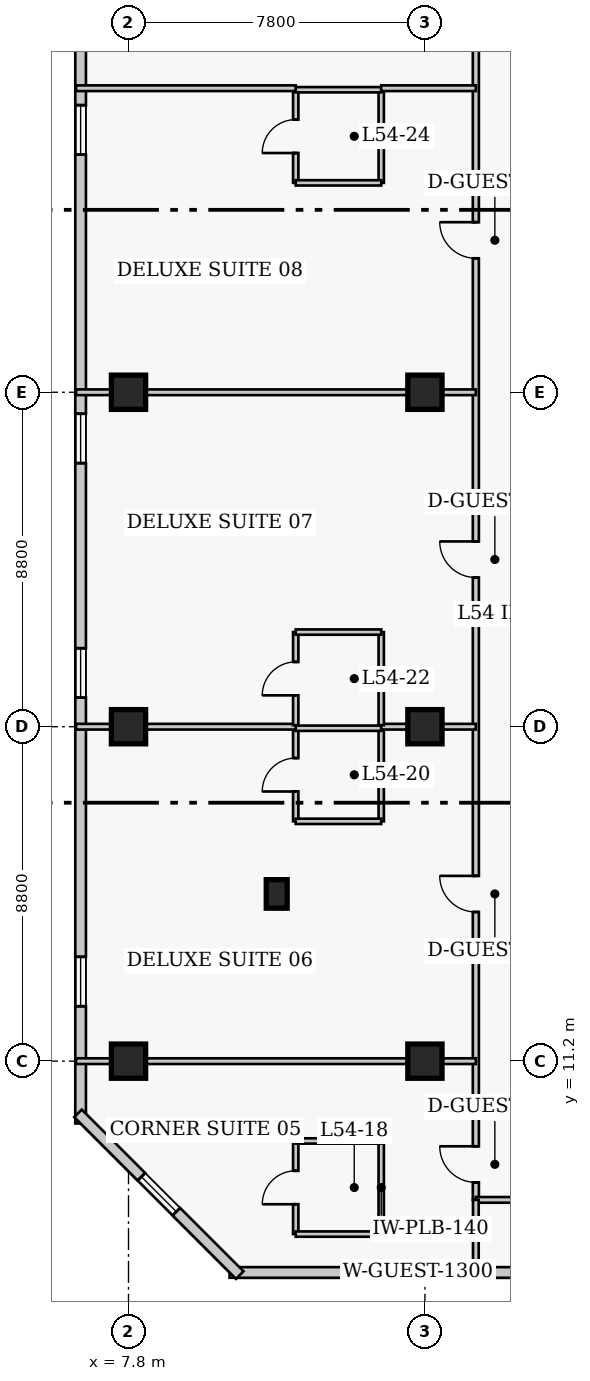
"""IFC4 building model, lengths in metres.
Left out: names, types, materials, properties, quantities, classifications, styles, units other than length and angle.
Written with IfcOpenShell. Run it as: python <this file> out.ifc"""

import sys

from ifc_helpers import new_model, si_unit, direction, frame, frame_2d, origin, origin_2d, place, context, subcontext, project, spatial, rectangle, extrude, element, fill, save


model = new_model("IFC4")
c1 = context("Model", 3, precision=1e-05, world=origin(), true_north=direction((0.0, 1.0)))
c2 = subcontext(c1, "Body", "Model", "MODEL_VIEW")
j1 = project(units=[si_unit("LENGTHUNIT", "METRE"), si_unit("PLANEANGLEUNIT", "RADIAN")], contexts=[c1])
p1 = place(None, origin())
s1 = spatial("IfcSite", under=j1, at=p1, CompositionType="ELEMENT")
p2 = place(p1, origin())
s2 = spatial("IfcBuilding", under=s1, at=p2, CompositionType="ELEMENT")
p3 = place(p2, frame((0.0, 0.0, 216.3)))
s3 = spatial("IfcBuildingStorey", under=s2, at=p3, CompositionType="ELEMENT", Elevation=216.3)
for number, where, z_axis, x_axis in (
    (1, (7.8, 11.2, 0.0), (0.0, 0.0, 1.0), (1.0, 0.0, 0.0)),
    (2, (7.8, 20.0, 0.0), (0.0, 0.0, 1.0), (1.0, 0.0, 0.0)),
    (3, (7.8, 28.8, 0.0), (0.0, 0.0, 1.0), (1.0, 0.0, 0.0)),
    (4, (15.6, 11.2, 0.0), (0.0, 0.0, 1.0), (1.0, 0.0, 0.0)),
    (5, (15.6, 20.0, 0.0), (0.0, 0.0, 1.0), (1.0, 0.0, 0.0)),
    (6, (15.6, 28.8, 0.0), (0.0, 0.0, 1.0), (1.0, 0.0, 0.0)),
):
    element("IfcColumn", number, at=place(p3, frame(where, z_axis=z_axis, x_axis=x_axis)), inside=s3, PredefinedType="COLUMN", context=c2, shape_type="SweptSolid", body=[
        extrude(rectangle(XDim=0.9, YDim=0.9, at=origin_2d()), origin(), (0.0, 0.0, 1.0), 3.9),
    ])
p4 = place(p3, frame((11.7, 15.6, 0.0), z_axis=(0.0, 0.0, 1.0), x_axis=(1.0, 0.0, 0.0)))
e7 = element("IfcColumn", 7, at=p4, inside=s3, PredefinedType="PILASTER", context=c2, shape_type="SweptSolid", body=[
    extrude(rectangle(XDim=0.55, YDim=0.75, at=origin_2d()), origin(), (0.0, 0.0, 1.0), 3.9),
])
p5 = place(p3, frame((10.46, 5.64, 0.0), z_axis=(0.0, 0.0, 1.0), x_axis=(1.0, 0.0, 0.0)))
e8 = element("IfcWall", 8, at=p5, inside=s3, PredefinedType="SOLIDWALL", context=c2, shape_type="SweptSolid", body=[
    extrude(rectangle(XDim=25.83, YDim=0.28, at=frame_2d((12.915, 0.0))), origin(), (0.0, 0.0, 1.0), 3.65),
])
p6 = place(p5, frame((4.305, 0.0, 0.85)))
e9 = element("IfcOpeningElement", 9, at=p6, cuts=e8, PredefinedType="OPENING", context=c2, shape_type="SweptSolid", body=[
    extrude(rectangle(XDim=1.3, YDim=1.7, at=frame_2d((0.65, 0.85))), frame((0.0, 0.15, 0.0), z_axis=(0.0, -1.0, 0.0), x_axis=(1.0, 0.0, 0.0)), (0.0, 0.0, 1.0), 0.3),
])
p7 = place(p5, frame((11.615, 0.0, 0.85)))
e10 = element("IfcOpeningElement", 10, at=p7, cuts=e8, PredefinedType="OPENING", context=c2, shape_type="SweptSolid", body=[
    extrude(rectangle(XDim=1.3, YDim=1.7, at=frame_2d((0.65, 0.85))), frame((0.0, 0.15, 0.0), z_axis=(0.0, -1.0, 0.0), x_axis=(1.0, 0.0, 0.0)), (0.0, 0.0, 1.0), 0.3),
])
p8 = place(p5, frame((20.875, 0.0, 0.85)))
e11 = element("IfcOpeningElement", 11, at=p8, cuts=e8, PredefinedType="OPENING", context=c2, shape_type="SweptSolid", body=[
    extrude(rectangle(XDim=1.3, YDim=1.7, at=frame_2d((0.65, 0.85))), frame((0.0, 0.15, 0.0), z_axis=(0.0, -1.0, 0.0), x_axis=(1.0, 0.0, 0.0)), (0.0, 0.0, 1.0), 0.3),
])
p9 = place(p5, frame((16.38, 0.0, 0.85)))
e12 = element("IfcOpeningElement", 12, at=p9, cuts=e8, PredefinedType="OPENING", context=c2, shape_type="SweptSolid", body=[
    extrude(rectangle(XDim=1.3, YDim=1.7, at=frame_2d((0.65, 0.85))), frame((0.0, 0.15, 0.0), z_axis=(0.0, -1.0, 0.0), x_axis=(1.0, 0.0, 0.0)), (0.0, 0.0, 1.0), 0.3),
])
p10 = place(p3, frame((6.54, 39.44, 0.0), z_axis=(0.0, 0.0, 1.0), x_axis=(0.0, -1.0, 0.0)))
e13 = element("IfcWall", 13, at=p10, inside=s3, PredefinedType="SOLIDWALL", context=c2, shape_type="SweptSolid", body=[
    extrude(rectangle(XDim=29.88, YDim=0.28, at=frame_2d((14.94, 0.0))), origin(), (0.0, 0.0, 1.0), 3.65),
])
p11 = place(p10, frame((3.085, 0.0, 0.85)))
e14 = element("IfcOpeningElement", 14, at=p11, cuts=e13, PredefinedType="OPENING", context=c2, shape_type="SweptSolid", body=[
    extrude(rectangle(XDim=1.3, YDim=1.7, at=frame_2d((0.65, 0.85))), frame((0.0, 0.15, 0.0), z_axis=(0.0, -1.0, 0.0), x_axis=(1.0, 0.0, 0.0)), (0.0, 0.0, 1.0), 0.3),
])
p12 = place(p10, frame((11.205, 0.0, 0.85)))
e15 = element("IfcOpeningElement", 15, at=p12, cuts=e13, PredefinedType="OPENING", context=c2, shape_type="SweptSolid", body=[
    extrude(rectangle(XDim=1.3, YDim=1.7, at=frame_2d((0.65, 0.85))), frame((0.0, 0.15, 0.0), z_axis=(0.0, -1.0, 0.0), x_axis=(1.0, 0.0, 0.0)), (0.0, 0.0, 1.0), 0.3),
])
p13 = place(p10, frame((17.375, 0.0, 0.85)))
e16 = element("IfcOpeningElement", 16, at=p13, cuts=e13, PredefinedType="OPENING", context=c2, shape_type="SweptSolid", body=[
    extrude(rectangle(XDim=1.3, YDim=1.7, at=frame_2d((0.65, 0.85))), frame((0.0, 0.15, 0.0), z_axis=(0.0, -1.0, 0.0), x_axis=(1.0, 0.0, 0.0)), (0.0, 0.0, 1.0), 0.3),
])
p14 = place(p10, frame((25.495, 0.0, 0.85)))
e17 = element("IfcOpeningElement", 17, at=p14, cuts=e13, PredefinedType="OPENING", context=c2, shape_type="SweptSolid", body=[
    extrude(rectangle(XDim=1.3, YDim=1.7, at=frame_2d((0.65, 0.85))), frame((0.0, 0.15, 0.0), z_axis=(0.0, -1.0, 0.0), x_axis=(1.0, 0.0, 0.0)), (0.0, 0.0, 1.0), 0.3),
])
p15 = place(p3, frame((6.471, 9.827, 0.0), z_axis=(0.0, 0.0, 1.0), x_axis=(0.707106781187, -0.707106781187, 0.0)))
e18 = element("IfcWall", 18, at=p15, inside=s3, PredefinedType="SOLIDWALL", context=c2, shape_type="SweptSolid", body=[
    extrude(rectangle(XDim=6.02, YDim=0.28, at=frame_2d((3.01, 0.0))), origin(), (0.0, 0.0, 1.0), 3.65),
])
p16 = place(p15, frame((2.36, 0.0, 0.85)))
e19 = element("IfcOpeningElement", 19, at=p16, cuts=e18, PredefinedType="OPENING", context=c2, shape_type="SweptSolid", body=[
    extrude(rectangle(XDim=1.3, YDim=1.7, at=frame_2d((0.65, 0.85))), frame((0.0, 0.15, 0.0), z_axis=(0.0, -1.0, 0.0), x_axis=(1.0, 0.0, 0.0)), (0.0, 0.0, 1.0), 0.3),
])
p17 = place(p3, frame((16.94, 7.55, 0.0), z_axis=(0.0, 0.0, 1.0), x_axis=(0.0, 1.0, 0.0)))
e20 = element("IfcWall", 20, at=p17, inside=s3, PredefinedType="PARTITIONING", context=c2, shape_type="SweptSolid", body=[
    extrude(rectangle(XDim=33.1, YDim=0.16, at=frame_2d((16.55, 0.0))), origin(), (0.0, 0.0, 1.0), 3.65),
])
p18 = place(p17, frame((0.46, 0.0, 0.0)))
e21 = element("IfcOpeningElement", 21, at=p18, cuts=e20, PredefinedType="OPENING", context=c2, shape_type="SweptSolid", body=[
    extrude(rectangle(XDim=0.95, YDim=2.1, at=frame_2d((0.475, 1.05))), frame((0.0, 0.09, 0.0), z_axis=(0.0, -1.0, 0.0), x_axis=(1.0, 0.0, 0.0)), (0.0, 0.0, 1.0), 0.18),
])
p19 = place(p17, frame((7.575, 0.0, 0.0)))
e22 = element("IfcOpeningElement", 22, at=p19, cuts=e20, PredefinedType="OPENING", context=c2, shape_type="SweptSolid", body=[
    extrude(rectangle(XDim=0.95, YDim=2.1, at=frame_2d((0.475, 1.05))), frame((0.0, 0.09, 0.0), z_axis=(0.0, -1.0, 0.0), x_axis=(1.0, 0.0, 0.0)), (0.0, 0.0, 1.0), 0.18),
])
p20 = place(p17, frame((16.375, 0.0, 0.0)))
e23 = element("IfcOpeningElement", 23, at=p20, cuts=e20, PredefinedType="OPENING", context=c2, shape_type="SweptSolid", body=[
    extrude(rectangle(XDim=0.95, YDim=2.1, at=frame_2d((0.475, 1.05))), frame((0.0, 0.09, 0.0), z_axis=(0.0, -1.0, 0.0), x_axis=(1.0, 0.0, 0.0)), (0.0, 0.0, 1.0), 0.18),
])
p21 = place(p17, frame((24.775, 0.0, 0.0)))
e24 = element("IfcOpeningElement", 24, at=p21, cuts=e20, PredefinedType="OPENING", context=c2, shape_type="SweptSolid", body=[
    extrude(rectangle(XDim=0.95, YDim=2.1, at=frame_2d((0.475, 1.05))), frame((0.0, 0.09, 0.0), z_axis=(0.0, -1.0, 0.0), x_axis=(1.0, 0.0, 0.0)), (0.0, 0.0, 1.0), 0.18),
])
p22 = place(p17, frame((31.66, 0.0, 0.0)))
e25 = element("IfcOpeningElement", 25, at=p22, cuts=e20, PredefinedType="OPENING", context=c2, shape_type="SweptSolid", body=[
    extrude(rectangle(XDim=1.0, YDim=2.15, at=frame_2d((0.5, 1.075))), frame((0.0, 0.09, 0.0), z_axis=(0.0, -1.0, 0.0), x_axis=(1.0, 0.0, 0.0)), (0.0, 0.0, 1.0), 0.18),
])
p23 = place(p3, frame((16.94, 7.55, 0.0), z_axis=(0.0, 0.0, 1.0), x_axis=(1.0, 0.0, 0.0)))
e26 = element("IfcWall", 26, at=p23, inside=s3, PredefinedType="PARTITIONING", context=c2, shape_type="SweptSolid", body=[
    extrude(rectangle(XDim=2.22, YDim=0.15, at=frame_2d((1.11, 0.0))), origin(), (0.0, 0.0, 1.0), 3.65),
])
p24 = place(p3, frame((16.94, 5.52, 0.0), z_axis=(0.0, 0.0, 1.0), x_axis=(0.0, 1.0, 0.0)))
e27 = element("IfcWall", 27, at=p24, inside=s3, PredefinedType="PARTITIONING", context=c2, shape_type="SweptSolid", body=[
    extrude(rectangle(XDim=2.03, YDim=0.15, at=frame_2d((1.015, 0.0))), origin(), (0.0, 0.0, 1.0), 3.65),
])
p25 = place(p3, frame((12.2, 6.65, 0.0), z_axis=(0.0, 0.0, 1.0), x_axis=(0.0, 1.0, 0.0)))
e28 = element("IfcWall", 28, at=p25, inside=s3, PredefinedType="PLUMBINGWALL", context=c2, shape_type="SweptSolid", body=[
    extrude(rectangle(XDim=2.45, YDim=0.14, at=frame_2d((1.225, 0.0))), origin(), (0.0, 0.0, 1.0), 3.65),
])
p26 = place(p25, frame((0.785, 0.0, 0.0)))
e29 = element("IfcOpeningElement", 29, at=p26, cuts=e28, PredefinedType="OPENING", context=c2, shape_type="SweptSolid", body=[
    extrude(rectangle(XDim=0.88, YDim=2.05, at=frame_2d((0.44, 1.025))), frame((0.0, 0.08, 0.0), z_axis=(0.0, -1.0, 0.0), x_axis=(1.0, 0.0, 0.0)), (0.0, 0.0, 1.0), 0.16),
])
p27 = place(p3, frame((14.45, 6.65, 0.0), z_axis=(0.0, 0.0, 1.0), x_axis=(0.0, 1.0, 0.0)))
e30 = element("IfcWall", 30, at=p27, inside=s3, PredefinedType="PLUMBINGWALL", context=c2, shape_type="SweptSolid", body=[
    extrude(rectangle(XDim=2.45, YDim=0.14, at=frame_2d((1.225, 0.0))), origin(), (0.0, 0.0, 1.0), 3.65),
])
for number, where, z_axis, x_axis in (
    (31, (12.2, 6.65, 0.0), (0.0, 0.0, 1.0), (1.0, 0.0, 0.0)),
    (32, (12.2, 9.1, 0.0), (0.0, 0.0, 1.0), (1.0, 0.0, 0.0)),
):
    element("IfcWall", number, at=place(p3, frame(where, z_axis=z_axis, x_axis=x_axis)), inside=s3, PredefinedType="PLUMBINGWALL", context=c2, shape_type="SweptSolid", body=[
        extrude(rectangle(XDim=2.25, YDim=0.14, at=frame_2d((1.125, 0.0))), origin(), (0.0, 0.0, 1.0), 3.65),
    ])
p28 = place(p3, frame((6.42, 11.2, 0.0), z_axis=(0.0, 0.0, 1.0), x_axis=(1.0, 0.0, 0.0)))
e33 = element("IfcWall", 33, at=p28, inside=s3, PredefinedType="PARTITIONING", context=c2, shape_type="SweptSolid", body=[
    extrude(rectangle(XDim=10.52, YDim=0.15, at=frame_2d((5.26, 0.0))), origin(), (0.0, 0.0, 1.0), 2.878),
])
p29 = place(p3, frame((12.2, 17.51, 0.0), z_axis=(0.0, 0.0, 1.0), x_axis=(0.0, 1.0, 0.0)))
e34 = element("IfcWall", 34, at=p29, inside=s3, PredefinedType="PLUMBINGWALL", context=c2, shape_type="SweptSolid", body=[
    extrude(rectangle(XDim=2.45, YDim=0.14, at=frame_2d((1.225, 0.0))), origin(), (0.0, 0.0, 1.0), 3.65),
])
p30 = place(p29, frame((0.785, 0.0, 0.0)))
e35 = element("IfcOpeningElement", 35, at=p30, cuts=e34, PredefinedType="OPENING", context=c2, shape_type="SweptSolid", body=[
    extrude(rectangle(XDim=0.88, YDim=2.05, at=frame_2d((0.44, 1.025))), frame((0.0, 0.08, 0.0), z_axis=(0.0, -1.0, 0.0), x_axis=(1.0, 0.0, 0.0)), (0.0, 0.0, 1.0), 0.16),
])
p31 = place(p3, frame((14.45, 17.51, 0.0), z_axis=(0.0, 0.0, 1.0), x_axis=(0.0, 1.0, 0.0)))
e36 = element("IfcWall", 36, at=p31, inside=s3, PredefinedType="PLUMBINGWALL", context=c2, shape_type="SweptSolid", body=[
    extrude(rectangle(XDim=2.45, YDim=0.14, at=frame_2d((1.225, 0.0))), origin(), (0.0, 0.0, 1.0), 3.65),
])
p32 = place(p3, frame((12.2, 17.51, 0.0), z_axis=(0.0, 0.0, 1.0), x_axis=(1.0, 0.0, 0.0)))
e37 = element("IfcWall", 37, at=p32, inside=s3, PredefinedType="PLUMBINGWALL", context=c2, shape_type="SweptSolid", body=[
    extrude(rectangle(XDim=2.25, YDim=0.14, at=frame_2d((1.125, 0.0))), origin(), (0.0, 0.0, 1.0), 3.65),
])
p33 = place(p3, frame((12.2, 19.96, 0.0), z_axis=(0.0, 0.0, 1.0), x_axis=(1.0, 0.0, 0.0)))
e38 = element("IfcWall", 38, at=p33, inside=s3, PredefinedType="PLUMBINGWALL", context=c2, shape_type="SweptSolid", body=[
    extrude(rectangle(XDim=2.25, YDim=0.14, at=frame_2d((1.125, 0.0))), origin(), (0.0, 0.0, 1.0), 3.038),
])
p34 = place(p3, frame((6.42, 20.0, 0.0), z_axis=(0.0, 0.0, 1.0), x_axis=(1.0, 0.0, 0.0)))
e39 = element("IfcWall", 39, at=p34, inside=s3, PredefinedType="PARTITIONING", context=c2, shape_type="SweptSolid", body=[
    extrude(rectangle(XDim=5.78, YDim=0.15, at=frame_2d((2.89, 0.0))), origin(), (0.0, 0.0, 1.0), 2.878),
])
p35 = place(p3, frame((14.45, 20.0, 0.0), z_axis=(0.0, 0.0, 1.0), x_axis=(1.0, 0.0, 0.0)))
e40 = element("IfcWall", 40, at=p35, inside=s3, PredefinedType="PARTITIONING", context=c2, shape_type="SweptSolid", body=[
    extrude(rectangle(XDim=2.49, YDim=0.15, at=frame_2d((1.245, 0.0))), origin(), (0.0, 0.0, 1.0), 2.878),
])
p36 = place(p3, frame((12.2, 20.04, 0.0), z_axis=(0.0, 0.0, 1.0), x_axis=(0.0, 1.0, 0.0)))
e41 = element("IfcWall", 41, at=p36, inside=s3, PredefinedType="PLUMBINGWALL", context=c2, shape_type="SweptSolid", body=[
    extrude(rectangle(XDim=2.45, YDim=0.14, at=frame_2d((1.225, 0.0))), origin(), (0.0, 0.0, 1.0), 3.65),
])
p37 = place(p36, frame((0.785, 0.0, 0.0)))
e42 = element("IfcOpeningElement", 42, at=p37, cuts=e41, PredefinedType="OPENING", context=c2, shape_type="SweptSolid", body=[
    extrude(rectangle(XDim=0.88, YDim=2.05, at=frame_2d((0.44, 1.025))), frame((0.0, 0.08, 0.0), z_axis=(0.0, -1.0, 0.0), x_axis=(1.0, 0.0, 0.0)), (0.0, 0.0, 1.0), 0.16),
])
p38 = place(p3, frame((14.45, 20.04, 0.0), z_axis=(0.0, 0.0, 1.0), x_axis=(0.0, 1.0, 0.0)))
e43 = element("IfcWall", 43, at=p38, inside=s3, PredefinedType="PLUMBINGWALL", context=c2, shape_type="SweptSolid", body=[
    extrude(rectangle(XDim=2.45, YDim=0.14, at=frame_2d((1.225, 0.0))), origin(), (0.0, 0.0, 1.0), 3.65),
])
p39 = place(p3, frame((12.2, 22.49, 0.0), z_axis=(0.0, 0.0, 1.0), x_axis=(1.0, 0.0, 0.0)))
e44 = element("IfcWall", 44, at=p39, inside=s3, PredefinedType="PLUMBINGWALL", context=c2, shape_type="SweptSolid", body=[
    extrude(rectangle(XDim=2.25, YDim=0.14, at=frame_2d((1.125, 0.0))), origin(), (0.0, 0.0, 1.0), 3.65),
])
p40 = place(p3, frame((6.42, 28.8, 0.0), z_axis=(0.0, 0.0, 1.0), x_axis=(1.0, 0.0, 0.0)))
e45 = element("IfcWall", 45, at=p40, inside=s3, PredefinedType="PARTITIONING", context=c2, shape_type="SweptSolid", body=[
    extrude(rectangle(XDim=10.52, YDim=0.15, at=frame_2d((5.26, 0.0))), origin(), (0.0, 0.0, 1.0), 2.878),
])
p41 = place(p3, frame((12.2, 34.31, 0.0), z_axis=(0.0, 0.0, 1.0), x_axis=(0.0, 1.0, 0.0)))
e46 = element("IfcWall", 46, at=p41, inside=s3, PredefinedType="PLUMBINGWALL", context=c2, shape_type="SweptSolid", body=[
    extrude(rectangle(XDim=2.45, YDim=0.14, at=frame_2d((1.225, 0.0))), origin(), (0.0, 0.0, 1.0), 3.65),
])
p42 = place(p41, frame((0.785, 0.0, 0.0)))
e47 = element("IfcOpeningElement", 47, at=p42, cuts=e46, PredefinedType="OPENING", context=c2, shape_type="SweptSolid", body=[
    extrude(rectangle(XDim=0.88, YDim=2.05, at=frame_2d((0.44, 1.025))), frame((0.0, 0.08, 0.0), z_axis=(0.0, -1.0, 0.0), x_axis=(1.0, 0.0, 0.0)), (0.0, 0.0, 1.0), 0.16),
])
p43 = place(p3, frame((14.45, 34.31, 0.0), z_axis=(0.0, 0.0, 1.0), x_axis=(0.0, 1.0, 0.0)))
e48 = element("IfcWall", 48, at=p43, inside=s3, PredefinedType="PLUMBINGWALL", context=c2, shape_type="SweptSolid", body=[
    extrude(rectangle(XDim=2.45, YDim=0.14, at=frame_2d((1.225, 0.0))), origin(), (0.0, 0.0, 1.0), 3.65),
])
for number, where, z_axis, x_axis in (
    (49, (12.2, 34.31, 0.0), (0.0, 0.0, 1.0), (1.0, 0.0, 0.0)),
    (50, (12.2, 36.76, 0.0), (0.0, 0.0, 1.0), (1.0, 0.0, 0.0)),
):
    element("IfcWall", number, at=place(p3, frame(where, z_axis=z_axis, x_axis=x_axis)), inside=s3, PredefinedType="PLUMBINGWALL", context=c2, shape_type="SweptSolid", body=[
        extrude(rectangle(XDim=2.25, YDim=0.14, at=frame_2d((1.125, 0.0))), origin(), (0.0, 0.0, 1.0), 3.65),
    ])
p44 = place(p3, frame((6.42, 36.8, 0.0), z_axis=(0.0, 0.0, 1.0), x_axis=(1.0, 0.0, 0.0)))
e51 = element("IfcWall", 51, at=p44, inside=s3, PredefinedType="PARTITIONING", context=c2, shape_type="SweptSolid", body=[
    extrude(rectangle(XDim=5.78, YDim=0.15, at=frame_2d((2.89, 0.0))), origin(), (0.0, 0.0, 1.0), 3.65),
])
p45 = place(p3, frame((14.45, 36.8, 0.0), z_axis=(0.0, 0.0, 1.0), x_axis=(1.0, 0.0, 0.0)))
e52 = element("IfcWall", 52, at=p45, inside=s3, PredefinedType="PARTITIONING", context=c2, shape_type="SweptSolid", body=[
    extrude(rectangle(XDim=2.49, YDim=0.15, at=frame_2d((1.245, 0.0))), origin(), (0.0, 0.0, 1.0), 3.65),
])
p46 = place(p6, origin())
e53 = element("IfcWindow", 53, at=p46, inside=s3, PartitioningType="SINGLE_PANEL", PredefinedType="WINDOW", context=c2, shape_type="SweptSolid", body=[
    extrude(rectangle(XDim=1.3, YDim=1.7, at=frame_2d((0.65, 0.85))), frame((0.0, 0.03, 0.0), z_axis=(0.0, -1.0, 0.0), x_axis=(1.0, 0.0, 0.0)), (0.0, 0.0, 1.0), 0.06),
])
fill(e9, e53)
p47 = place(p11, origin())
e54 = element("IfcWindow", 54, at=p47, inside=s3, PartitioningType="SINGLE_PANEL", PredefinedType="WINDOW", context=c2, shape_type="SweptSolid", body=[
    extrude(rectangle(XDim=1.3, YDim=1.7, at=frame_2d((0.65, 0.85))), frame((0.0, 0.03, 0.0), z_axis=(0.0, -1.0, 0.0), x_axis=(1.0, 0.0, 0.0)), (0.0, 0.0, 1.0), 0.06),
])
fill(e14, e54)
p48 = place(p12, origin())
e55 = element("IfcWindow", 55, at=p48, inside=s3, PartitioningType="SINGLE_PANEL", PredefinedType="WINDOW", context=c2, shape_type="SweptSolid", body=[
    extrude(rectangle(XDim=1.3, YDim=1.7, at=frame_2d((0.65, 0.85))), frame((0.0, 0.03, 0.0), z_axis=(0.0, -1.0, 0.0), x_axis=(1.0, 0.0, 0.0)), (0.0, 0.0, 1.0), 0.06),
])
fill(e15, e55)
p49 = place(p13, origin())
e56 = element("IfcWindow", 56, at=p49, inside=s3, PartitioningType="SINGLE_PANEL", PredefinedType="WINDOW", context=c2, shape_type="SweptSolid", body=[
    extrude(rectangle(XDim=1.3, YDim=1.7, at=frame_2d((0.65, 0.85))), frame((0.0, 0.03, 0.0), z_axis=(0.0, -1.0, 0.0), x_axis=(1.0, 0.0, 0.0)), (0.0, 0.0, 1.0), 0.06),
])
fill(e16, e56)
p50 = place(p14, origin())
e57 = element("IfcWindow", 57, at=p50, inside=s3, PartitioningType="SINGLE_PANEL", PredefinedType="WINDOW", context=c2, shape_type="SweptSolid", body=[
    extrude(rectangle(XDim=1.3, YDim=1.7, at=frame_2d((0.65, 0.85))), frame((0.0, 0.03, 0.0), z_axis=(0.0, -1.0, 0.0), x_axis=(1.0, 0.0, 0.0)), (0.0, 0.0, 1.0), 0.06),
])
fill(e17, e57)
p51 = place(p16, origin())
e58 = element("IfcWindow", 58, at=p51, inside=s3, PartitioningType="SINGLE_PANEL", PredefinedType="WINDOW", context=c2, shape_type="SweptSolid", body=[
    extrude(rectangle(XDim=1.3, YDim=1.7, at=frame_2d((0.65, 0.85))), frame((0.0, 0.03, 0.0), z_axis=(0.0, -1.0, 0.0), x_axis=(1.0, 0.0, 0.0)), (0.0, 0.0, 1.0), 0.06),
])
fill(e19, e58)
p52 = place(p26, origin())
e59 = element("IfcDoor", 59, at=p52, inside=s3, OperationType="SINGLE_SWING_LEFT", PredefinedType="DOOR", context=c2, shape_type="SweptSolid", body=[
    extrude(rectangle(XDim=0.88, YDim=2.05, at=frame_2d((0.44, 1.025))), frame((0.0, 0.025, 0.0), z_axis=(0.0, -1.0, 0.0), x_axis=(1.0, 0.0, 0.0)), (0.0, 0.0, 1.0), 0.05),
])
fill(e29, e59)
p53 = place(p18, origin())
e60 = element("IfcDoor", 60, at=p53, inside=s3, OperationType="SINGLE_SWING_RIGHT", PredefinedType="DOOR", context=c2, shape_type="SweptSolid", body=[
    extrude(rectangle(XDim=0.95, YDim=2.1, at=frame_2d((0.475, 1.05))), frame((0.0, 0.025, 0.0), z_axis=(0.0, -1.0, 0.0), x_axis=(1.0, 0.0, 0.0)), (0.0, 0.0, 1.0), 0.05),
])
fill(e21, e60)
p54 = place(p30, origin())
e61 = element("IfcDoor", 61, at=p54, inside=s3, OperationType="SINGLE_SWING_LEFT", PredefinedType="DOOR", context=c2, shape_type="SweptSolid", body=[
    extrude(rectangle(XDim=0.88, YDim=2.05, at=frame_2d((0.44, 1.025))), frame((0.0, 0.025, 0.0), z_axis=(0.0, -1.0, 0.0), x_axis=(1.0, 0.0, 0.0)), (0.0, 0.0, 1.0), 0.05),
])
fill(e35, e61)
p55 = place(p19, origin())
e62 = element("IfcDoor", 62, at=p55, inside=s3, OperationType="SINGLE_SWING_RIGHT", PredefinedType="DOOR", context=c2, shape_type="SweptSolid", body=[
    extrude(rectangle(XDim=0.95, YDim=2.1, at=frame_2d((0.475, 1.05))), frame((0.0, 0.025, 0.0), z_axis=(0.0, -1.0, 0.0), x_axis=(1.0, 0.0, 0.0)), (0.0, 0.0, 1.0), 0.05),
])
fill(e22, e62)
p56 = place(p37, origin())
e63 = element("IfcDoor", 63, at=p56, inside=s3, OperationType="SINGLE_SWING_LEFT", PredefinedType="DOOR", context=c2, shape_type="SweptSolid", body=[
    extrude(rectangle(XDim=0.88, YDim=2.05, at=frame_2d((0.44, 1.025))), frame((0.0, 0.025, 0.0), z_axis=(0.0, -1.0, 0.0), x_axis=(1.0, 0.0, 0.0)), (0.0, 0.0, 1.0), 0.05),
])
fill(e42, e63)
p57 = place(p20, origin())
e64 = element("IfcDoor", 64, at=p57, inside=s3, OperationType="SINGLE_SWING_RIGHT", PredefinedType="DOOR", context=c2, shape_type="SweptSolid", body=[
    extrude(rectangle(XDim=0.95, YDim=2.1, at=frame_2d((0.475, 1.05))), frame((0.0, 0.025, 0.0), z_axis=(0.0, -1.0, 0.0), x_axis=(1.0, 0.0, 0.0)), (0.0, 0.0, 1.0), 0.05),
])
fill(e23, e64)
p58 = place(p42, origin())
e65 = element("IfcDoor", 65, at=p58, inside=s3, OperationType="SINGLE_SWING_LEFT", PredefinedType="DOOR", context=c2, shape_type="SweptSolid", body=[
    extrude(rectangle(XDim=0.88, YDim=2.05, at=frame_2d((0.44, 1.025))), frame((0.0, 0.025, 0.0), z_axis=(0.0, -1.0, 0.0), x_axis=(1.0, 0.0, 0.0)), (0.0, 0.0, 1.0), 0.05),
])
fill(e47, e65)
p59 = place(p21, origin())
e66 = element("IfcDoor", 66, at=p59, inside=s3, OperationType="SINGLE_SWING_RIGHT", PredefinedType="DOOR", context=c2, shape_type="SweptSolid", body=[
    extrude(rectangle(XDim=0.95, YDim=2.1, at=frame_2d((0.475, 1.05))), frame((0.0, 0.025, 0.0), z_axis=(0.0, -1.0, 0.0), x_axis=(1.0, 0.0, 0.0)), (0.0, 0.0, 1.0), 0.05),
])
fill(e24, e66)
save(model, sys.argv[1])
